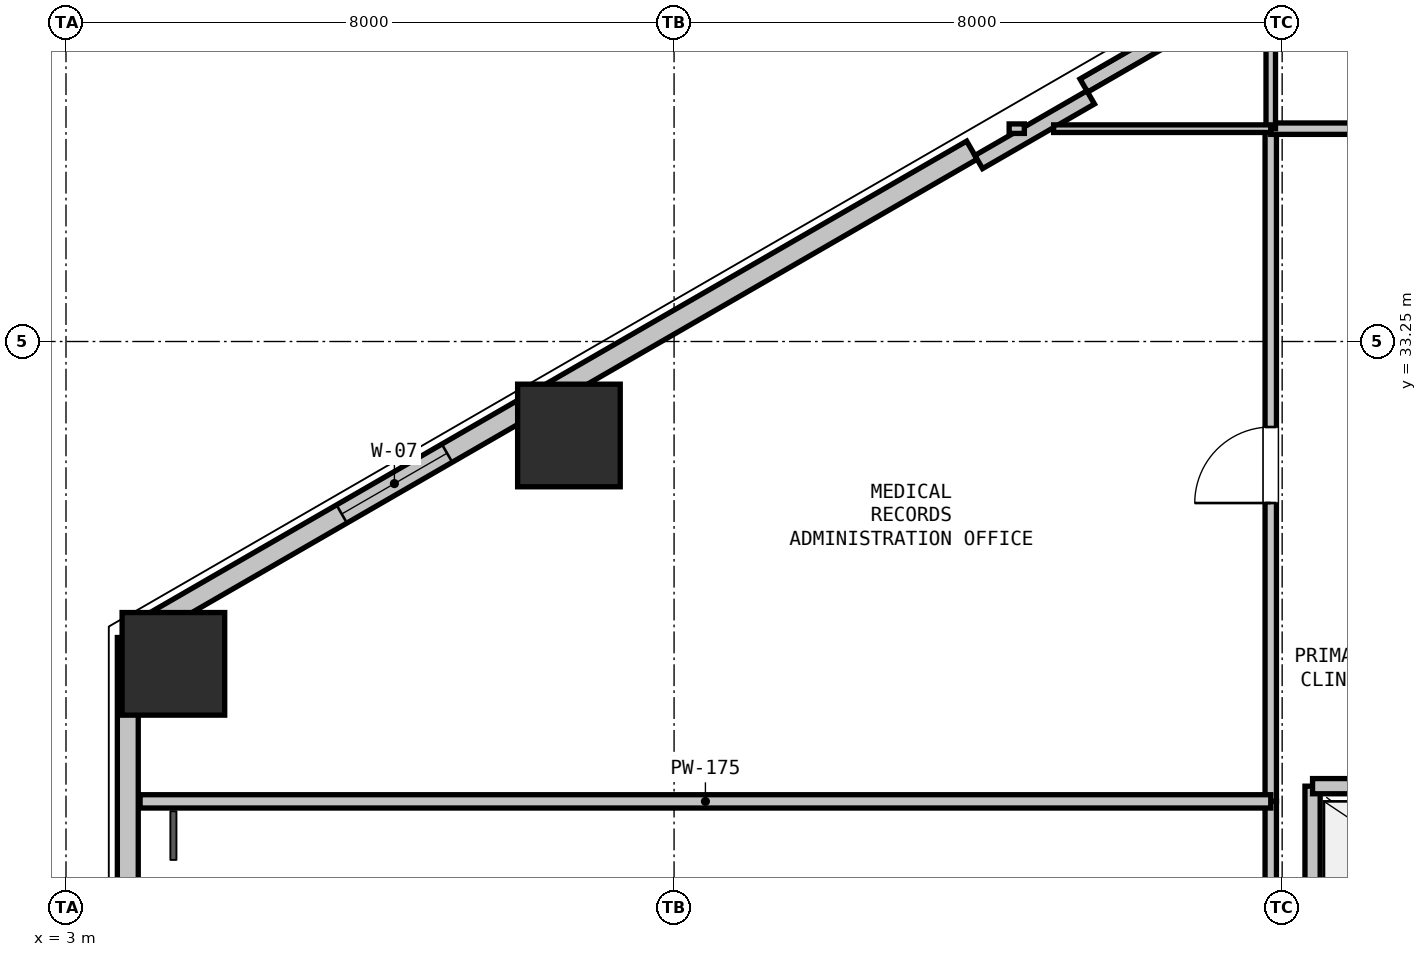
"""IFC4 building model, lengths in metres.
Left out: names, types, materials, properties, quantities, classifications, styles, units other than length and angle.
Written with IfcOpenShell. Run it as: python <this file> out.ifc"""

import sys

from ifc_helpers import new_model, si_unit, direction, frame, frame_2d, origin, origin_2d, place, context, subcontext, project, spatial, rectangle, hollow_rectangle, extrude, element, fill, save


model = new_model("IFC4")
c1 = context("Model", 3, precision=1e-05, world=origin(), true_north=direction((0.0, 1.0)))
c2 = subcontext(c1, "Body", "Model", "MODEL_VIEW")
j1 = project(units=[si_unit("LENGTHUNIT", "METRE"), si_unit("PLANEANGLEUNIT", "RADIAN")], contexts=[c1])
p1 = place(None, origin())
s1 = spatial("IfcSite", under=j1, at=p1, CompositionType="ELEMENT")
p2 = place(p1, origin())
s2 = spatial("IfcBuilding", under=s1, at=p2, CompositionType="ELEMENT")
p3 = place(p2, frame((0.0, 0.0, 14.4)))
s3 = spatial("IfcBuildingStorey", under=s2, at=p3, CompositionType="ELEMENT", Elevation=14.4)
for number, where, z_axis, x_axis in (
    (1, (4.413, 29.009, 0.0), (0.0, 0.0, 1.0), (1.0, 0.0, 0.0)),
    (2, (9.617, 32.014, 0.0), (0.0, 0.0, 1.0), (1.0, 0.0, 0.0)),
):
    element("IfcColumn", number, at=place(p3, frame(where, z_axis=z_axis, x_axis=x_axis)), inside=s3, PredefinedType="COLUMN", context=c2, shape_type="SweptSolid", body=[
        extrude(hollow_rectangle(XDim=1.35, YDim=1.35, WallThickness=0.036, at=origin_2d()), origin(), (0.0, 0.0, 1.0), 4.8),
    ])
p4 = place(p3, frame((3.813, 24.144, 0.0), z_axis=(0.0, 0.0, 1.0), x_axis=(0.0, 1.0, 0.0)))
e3 = element("IfcWall", 3, at=p4, inside=s3, PredefinedType="SOLIDWALL", context=c2, shape_type="SweptSolid", body=[
    extrude(rectangle(XDim=5.211, YDim=0.275, at=frame_2d((2.606, 0.0))), origin(), (0.0, 0.0, 1.0), 4.14),
])
p5 = place(p3, frame((3.943, 29.431, 0.0), z_axis=(0.0, 0.0, 1.0), x_axis=(0.866027105532, 0.499997052475, 0.0)))
e4 = element("IfcWall", 4, at=p5, inside=s3, PredefinedType="SOLIDWALL", context=c2, shape_type="SweptSolid", body=[
    extrude(rectangle(XDim=12.673, YDim=0.275, at=frame_2d((6.336, 0.0))), origin(), (0.0, 0.0, 1.0), 4.14),
])
p6 = place(p5, frame((3.1, 0.0, 0.9)))
e5 = element("IfcOpeningElement", 5, at=p6, cuts=e4, PredefinedType="OPENING", context=c2, shape_type="SweptSolid", body=[
    extrude(rectangle(XDim=1.6, YDim=1.8, at=frame_2d((0.8, 0.9))), frame((0.0, 0.147, 0.0), z_axis=(0.0, -1.0, 0.0), x_axis=(1.0, 0.0, 0.0)), (0.0, 0.0, 1.0), 0.295),
])
p7 = place(p3, frame((16.39, 36.617, 0.0), z_axis=(0.0, 0.0, 1.0), x_axis=(0.866027351828, 0.499996625875, 0.0)))
e6 = element("IfcWall", 6, at=p7, inside=s3, PredefinedType="PARAPET", context=c2, shape_type="SweptSolid", body=[
    extrude(rectangle(XDim=11.973, YDim=0.2, at=frame_2d((5.987, 0.0))), origin(), (0.0, 0.0, 1.0), 0.2),
])
p8 = place(p3, frame((15.008, 35.611, 0.0), z_axis=(0.0, 0.0, 1.0), x_axis=(0.86605165483, 0.499954529098, 0.0)))
e7 = element("IfcWall", 7, at=p8, inside=s3, PredefinedType="PARAPET", context=c2, shape_type="SweptSolid", body=[
    extrude(rectangle(XDim=1.7, YDim=0.2, at=frame_2d((0.85, 0.0))), origin(), (0.0, 0.0, 1.0), 4.14),
])
p9 = place(p3, frame((19.4, 25.4, 0.0), z_axis=(0.0, 0.0, 1.0), x_axis=(0.0, 1.0, 0.0)))
e8 = element("IfcWall", 8, at=p9, inside=s3, PredefinedType="PARTITIONING", context=c2, shape_type="SweptSolid", body=[
    extrude(rectangle(XDim=2.0, YDim=0.2, at=frame_2d((1.0, 0.0))), origin(), (0.0, 0.0, 1.0), 4.52),
])
p10 = place(p3, frame((19.4, 27.4, 0.0), z_axis=(0.0, 0.0, 1.0), x_axis=(1.0, 0.0, 0.0)))
e9 = element("IfcWall", 9, at=p10, inside=s3, PredefinedType="PARTITIONING", context=c2, shape_type="SweptSolid", body=[
    extrude(rectangle(XDim=2.8, YDim=0.2, at=frame_2d((1.4, 0.0))), origin(), (0.0, 0.0, 1.0), 3.969),
])
p11 = place(p3, frame((18.85, 22.8, 0.0), z_axis=(0.0, 0.0, 1.0), x_axis=(0.0, 1.0, 0.0)))
e10 = element("IfcWall", 10, at=p11, inside=s3, PredefinedType="PARTITIONING", context=c2, shape_type="SweptSolid", body=[
    extrude(rectangle(XDim=4.4, YDim=0.15, at=frame_2d((2.2, 0.0))), origin(), (0.0, 0.0, 1.0), 4.52),
])
p12 = place(p11, frame((1.521, 0.0, 0.0)))
e11 = element("IfcOpeningElement", 11, at=p12, cuts=e10, PredefinedType="OPENING", context=c2, shape_type="SweptSolid", body=[
    extrude(rectangle(XDim=0.85, YDim=2.1, at=frame_2d((0.425, 1.05))), frame((0.0, 0.085, 0.0), z_axis=(0.0, -1.0, 0.0), x_axis=(1.0, 0.0, 0.0)), (0.0, 0.0, 1.0), 0.17),
])
p13 = place(p3, frame((18.85, 27.2, 0.0), z_axis=(0.0, 0.0, 1.0), x_axis=(0.0, 1.0, 0.0)))
e12 = element("IfcWall", 12, at=p13, inside=s3, PredefinedType="PARTITIONING", context=c2, shape_type="SweptSolid", body=[
    extrude(rectangle(XDim=8.85, YDim=0.15, at=frame_2d((4.425, 0.0))), origin(), (0.0, 0.0, 1.0), 3.818),
])
p14 = place(p13, frame((3.925, 0.0, 0.0)))
e13 = element("IfcOpeningElement", 13, at=p14, cuts=e12, PredefinedType="OPENING", context=c2, shape_type="SweptSolid", body=[
    extrude(rectangle(XDim=1.0, YDim=2.15, at=frame_2d((0.5, 1.075))), frame((0.0, 0.085, 0.0), z_axis=(0.0, -1.0, 0.0), x_axis=(1.0, 0.0, 0.0)), (0.0, 0.0, 1.0), 0.17),
])
p15 = place(p3, frame((18.85, 36.05, 0.0), z_axis=(0.0, 0.0, 1.0), x_axis=(1.0, 0.0, 0.0)))
e14 = element("IfcWall", 14, at=p15, inside=s3, PredefinedType="PARTITIONING", context=c2, shape_type="SweptSolid", body=[
    extrude(rectangle(XDim=9.05, YDim=0.15, at=frame_2d((4.525, 0.0))), origin(), (0.0, 0.0, 1.0), 4.52),
])
p16 = place(p15, frame((3.725, 0.0, 0.0)))
e15 = element("IfcOpeningElement", 15, at=p16, cuts=e14, PredefinedType="OPENING", context=c2, shape_type="SweptSolid", body=[
    extrude(rectangle(XDim=1.6, YDim=2.2, at=frame_2d((0.8, 1.1))), frame((0.0, 0.085, 0.0), z_axis=(0.0, -1.0, 0.0), x_axis=(1.0, 0.0, 0.0)), (0.0, 0.0, 1.0), 0.17),
])
p17 = place(p3, frame((3.975, 27.2, 0.0), z_axis=(0.0, 0.0, 1.0), x_axis=(1.0, 0.0, 0.0)))
e16 = element("IfcWall", 16, at=p17, inside=s3, PredefinedType="PLUMBINGWALL", context=c2, shape_type="SweptSolid", body=[
    extrude(rectangle(XDim=14.875, YDim=0.175, at=frame_2d((7.438, 0.0))), origin(), (0.0, 0.0, 1.0), 4.131),
])
p18 = place(p3, frame((18.85, 36.05, 0.0), z_axis=(0.0, 0.0, 1.0), x_axis=(0.0, 1.0, 0.0)))
e17 = element("IfcWall", 17, at=p18, inside=s3, PredefinedType="PARTITIONING", context=c2, shape_type="SweptSolid", body=[
    extrude(rectangle(XDim=1.941, YDim=0.125, at=frame_2d((0.97, 0.0))), origin(), (0.0, 0.0, 1.0), 4.131),
])
p19 = place(p3, frame((15.408, 36.05, 0.0), z_axis=(0.0, 0.0, 1.0), x_axis=(1.0, 0.0, 0.0)))
e18 = element("IfcWall", 18, at=p19, inside=s3, PredefinedType="PARTITIONING", context=c2, shape_type="SweptSolid", body=[
    extrude(rectangle(XDim=0.2, YDim=0.125, at=frame_2d((0.1, 0.0))), origin(), (0.0, 0.0, 1.0), 4.52),
])
p20 = place(p3, frame((15.993, 36.05, 0.0), z_axis=(0.0, 0.0, 1.0), x_axis=(1.0, 0.0, 0.0)))
e19 = element("IfcWall", 19, at=p20, inside=s3, PredefinedType="PARTITIONING", context=c2, shape_type="SweptSolid", body=[
    extrude(rectangle(XDim=2.857, YDim=0.1, at=frame_2d((1.428, 0.0))), origin(), (0.0, 0.0, 1.0), 4.131),
])
p21 = place(p3, frame((3.813, 29.356, 0.0), z_axis=(0.0, 0.0, 1.0), x_axis=(0.866131372301, 0.499816412211, 0.0)))
e20 = element("IfcWall", 20, at=p21, inside=s3, PredefinedType="PARTITIONING", context=c2, shape_type="SweptSolid", body=[
    extrude(rectangle(XDim=0.15, YDim=0.125, at=frame_2d((0.075, 0.0))), origin(), (0.0, 0.0, 1.0), 4.52),
])
p22 = place(p6, origin())
e21 = element("IfcWindow", 21, at=p22, inside=s3, PartitioningType="SINGLE_PANEL", PredefinedType="WINDOW", context=c2, shape_type="SweptSolid", body=[
    extrude(rectangle(XDim=1.6, YDim=1.8, at=frame_2d((0.8, 0.9))), frame((0.0, 0.03, 0.0), z_axis=(0.0, -1.0, 0.0), x_axis=(1.0, 0.0, 0.0)), (0.0, 0.0, 1.0), 0.06),
])
fill(e5, e21)
p23 = place(p14, origin())
e22 = element("IfcDoor", 22, at=p23, inside=s3, OperationType="SINGLE_SWING_LEFT", PredefinedType="DOOR", context=c2, shape_type="SweptSolid", body=[
    extrude(rectangle(XDim=1.0, YDim=2.15, at=frame_2d((0.5, 1.075))), frame((0.0, 0.025, 0.0), z_axis=(0.0, -1.0, 0.0), x_axis=(1.0, 0.0, 0.0)), (0.0, 0.0, 1.0), 0.05),
])
fill(e13, e22)
save(model, sys.argv[1])
